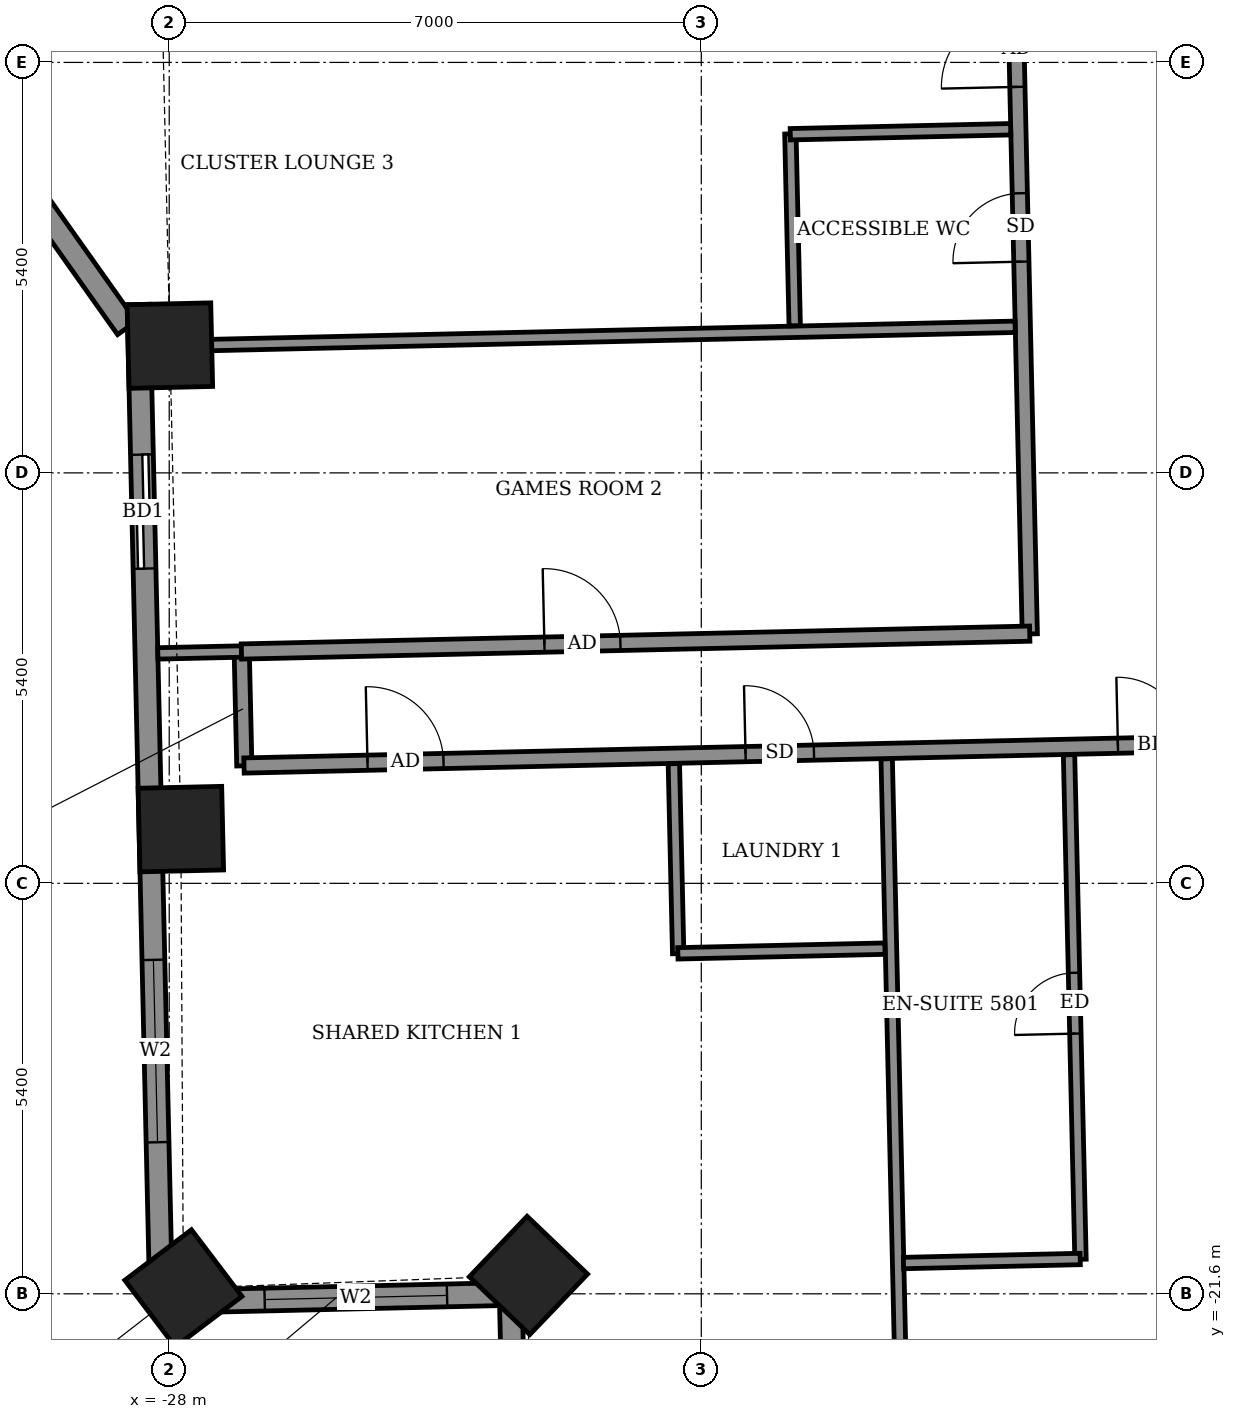
"""IFC4 building model, lengths in metres.
Left out: names, types, materials, properties, quantities, classifications, styles, units other than length and angle.
Written with IfcOpenShell. Run it as: python <this file> out.ifc"""

import sys

from ifc_helpers import new_model, si_unit, direction, frame, frame_2d, origin, origin_2d, place, context, subcontext, project, spatial, rectangle, extrude, element, fill, save


model = new_model("IFC4")
c1 = context("Model", 3, precision=1e-05, world=origin(), true_north=direction((0.0, 1.0)))
c2 = subcontext(c1, "Body", "Model", "MODEL_VIEW")
j1 = project(units=[si_unit("LENGTHUNIT", "METRE"), si_unit("PLANEANGLEUNIT", "RADIAN")], contexts=[c1])
p1 = place(None, origin())
s1 = spatial("IfcSite", under=j1, at=p1, CompositionType="ELEMENT")
p2 = place(p1, origin())
s2 = spatial("IfcBuilding", under=s1, at=p2, CompositionType="ELEMENT")
p3 = place(p2, frame((0.0, 0.0, 231.1)))
s3 = spatial("IfcBuildingStorey", under=s2, at=p3, CompositionType="ELEMENT", Elevation=231.1)
for number, where, z_axis, x_axis in (
    (1, (-27.991, -9.125, -0.55), (0.0, 0.0, 1.0), (0.023, -1.0, 0.0)),
    (2, (-27.847, -15.487, -0.55), (0.0, 0.0, 1.0), (0.023, -1.0, 0.0)),
    (3, (-27.814, -21.528, -0.55), (0.0, 0.0, 1.0), (0.604, -0.797, 0.0)),
    (4, (-23.274, -21.358, -0.55), (0.0, 0.0, 1.0), (0.723, -0.691, 0.0)),
):
    element("IfcColumn", number, at=place(p3, frame(where, z_axis=z_axis, x_axis=x_axis)), inside=s3, PredefinedType="COLUMN", context=c2, shape_type="SweptSolid", body=[
        extrude(rectangle(XDim=1.1, YDim=1.1, at=origin_2d()), origin(), (0.0, 0.0, 1.0), 3.6),
    ])
p4 = place(p3, frame((-30.62, -5.982, 0.0), z_axis=(0.0, 0.0, 1.0), x_axis=(0.578108441206, -0.815959943996, 0.0)))
e5 = element("IfcWall", 5, at=p4, inside=s3, PredefinedType="SOLIDWALL", context=c2, shape_type="SweptSolid", body=[
    extrude(rectangle(XDim=3.569, YDim=0.3, at=frame_2d((1.784, 0.0))), origin(), (0.0, 0.0, 1.0), 3.05),
])
p5 = place(p4, frame((0.338, 0.0, 0.9)))
e6 = element("IfcOpeningElement", 6, at=p5, cuts=e5, PredefinedType="OPENING", context=c2, shape_type="SweptSolid", body=[
    extrude(rectangle(XDim=1.2, YDim=1.5, at=frame_2d((0.6, 0.75))), frame((0.0, 0.16, 0.0), z_axis=(0.0, -1.0, 0.0), x_axis=(1.0, 0.0, 0.0)), (0.0, 0.0, 1.0), 0.32),
])
p6 = place(p3, frame((-28.404, -8.585, 0.0), z_axis=(0.0, 0.0, 1.0), x_axis=(0.022711264838, -0.99974206596, 0.0)))
e7 = element("IfcWall", 7, at=p6, inside=s3, PredefinedType="SOLIDWALL", context=c2, shape_type="SweptSolid", body=[
    extrude(rectangle(XDim=13.125, YDim=0.3, at=frame_2d((6.563, 0.0))), origin(), (0.0, 0.0, 1.0), 2.55),
])
p7 = place(p6, frame((1.975, 0.0, 0.0)))
e8 = element("IfcOpeningElement", 8, at=p7, cuts=e7, PredefinedType="OPENING", context=c2, shape_type="SweptSolid", body=[
    extrude(rectangle(XDim=1.5, YDim=2.4, at=frame_2d((0.75, 1.2))), frame((0.0, 0.16, 0.0), z_axis=(0.0, -1.0, 0.0), x_axis=(1.0, 0.0, 0.0)), (0.0, 0.0, 1.0), 0.32),
])
p8 = place(p6, frame((8.624, 0.0, 0.9)))
e9 = element("IfcOpeningElement", 9, at=p8, cuts=e7, PredefinedType="OPENING", context=c2, shape_type="SweptSolid", body=[
    extrude(rectangle(XDim=2.4, YDim=1.5, at=frame_2d((1.2, 0.75))), frame((0.0, 0.16, 0.0), z_axis=(0.0, -1.0, 0.0), x_axis=(1.0, 0.0, 0.0)), (0.0, 0.0, 1.0), 0.32),
])
p9 = place(p3, frame((-28.106, -21.707, 0.0), z_axis=(0.0, 0.0, 1.0), x_axis=(0.999739556364, 0.022821468877, 0.0)))
e10 = element("IfcWall", 10, at=p9, inside=s3, PredefinedType="SOLIDWALL", context=c2, shape_type="SweptSolid", body=[
    extrude(rectangle(XDim=4.6, YDim=0.3, at=frame_2d((2.3, 0.0))), origin(), (0.0, 0.0, 1.0), 2.55),
])
p10 = place(p9, frame((1.362, 0.0, 0.9)))
e11 = element("IfcOpeningElement", 11, at=p10, cuts=e10, PredefinedType="OPENING", context=c2, shape_type="SweptSolid", body=[
    extrude(rectangle(XDim=2.4, YDim=1.5, at=frame_2d((1.2, 0.75))), frame((0.0, 0.16, 0.0), z_axis=(0.0, -1.0, 0.0), x_axis=(1.0, 0.0, 0.0)), (0.0, 0.0, 1.0), 0.32),
])
p11 = place(p3, frame((-23.507, -21.602, 0.0), z_axis=(0.0, 0.0, 1.0), x_axis=(0.022609285172, -0.999744377441, 0.0)))
e12 = element("IfcWall", 12, at=p11, inside=s3, PredefinedType="SOLIDWALL", context=c2, shape_type="SweptSolid", body=[
    extrude(rectangle(XDim=4.6, YDim=0.3, at=frame_2d((2.3, 0.0))), origin(), (0.0, 0.0, 1.0), 2.55),
])
p12 = place(p11, frame((0.832, 0.0, 0.9)))
e13 = element("IfcOpeningElement", 13, at=p12, cuts=e12, PredefinedType="OPENING", context=c2, shape_type="SweptSolid", body=[
    extrude(rectangle(XDim=2.4, YDim=1.5, at=frame_2d((1.2, 0.75))), frame((0.0, 0.16, 0.0), z_axis=(0.0, -1.0, 0.0), x_axis=(1.0, 0.0, 0.0)), (0.0, 0.0, 1.0), 0.32),
])
p13 = place(p3, frame((-18.303, -25.935, 0.0), z_axis=(0.0, 0.0, 1.0), x_axis=(-0.022684355347, 0.999742676904, 0.0)))
e14 = element("IfcWall", 14, at=p13, inside=s3, PredefinedType="PARTITIONING", context=c2, shape_type="SweptSolid", body=[
    extrude(rectangle(XDim=11.376, YDim=0.15, at=frame_2d((5.688, 0.0))), origin(), (0.0, 0.0, 1.0), 2.55),
])
p14 = place(p3, frame((-16.011, -21.146, 0.0), z_axis=(0.0, 0.0, 1.0), x_axis=(-0.022760662159, 0.999740942574, 0.0)))
e15 = element("IfcWall", 15, at=p14, inside=s3, PredefinedType="PARTITIONING", context=c2, shape_type="SweptSolid", body=[
    extrude(rectangle(XDim=6.64, YDim=0.15, at=frame_2d((3.32, 0.0))), origin(), (0.0, 0.0, 1.0), 3.05),
])
p15 = place(p14, frame((2.97, 0.0, 0.0)))
e16 = element("IfcOpeningElement", 16, at=p15, cuts=e15, PredefinedType="OPENING", context=c2, shape_type="SweptSolid", body=[
    extrude(rectangle(XDim=0.8, YDim=2.1, at=frame_2d((0.4, 1.05))), frame((0.0, 0.085, 0.0), z_axis=(0.0, -1.0, 0.0), x_axis=(1.0, 0.0, 0.0)), (0.0, 0.0, 1.0), 0.17),
])
p16 = place(p3, frame((-18.34, -21.195, 0.0), z_axis=(0.0, 0.0, 1.0), x_axis=(0.99974053329, 0.022778632478, 0.0)))
e17 = element("IfcWall", 17, at=p16, inside=s3, PredefinedType="PARTITIONING", context=c2, shape_type="SweptSolid", body=[
    extrude(rectangle(XDim=2.326, YDim=0.15, at=frame_2d((1.163, 0.0))), origin(), (0.0, 0.0, 1.0), 3.05),
])
p17 = place(p3, frame((-21.304, -17.125, 0.0), z_axis=(0.0, 0.0, 1.0), x_axis=(-0.022854521249, 0.999738801317, 0.0)))
e18 = element("IfcWall", 18, at=p17, inside=s3, PredefinedType="PARTITIONING", context=c2, shape_type="SweptSolid", body=[
    extrude(rectangle(XDim=2.5, YDim=0.15, at=frame_2d((1.25, 0.0))), origin(), (0.0, 0.0, 1.0), 3.05),
])
p18 = place(p3, frame((-21.308, -17.121, 0.0), z_axis=(0.0, 0.0, 1.0), x_axis=(0.999741002259, 0.022758040381, 0.0)))
e19 = element("IfcWall", 19, at=p18, inside=s3, PredefinedType="PARTITIONING", context=c2, shape_type="SweptSolid", body=[
    extrude(rectangle(XDim=2.725, YDim=0.15, at=frame_2d((1.362, 0.0))), origin(), (0.0, 0.0, 1.0), 3.05),
])
p19 = place(p3, frame((-27.012, -14.654, 0.0), z_axis=(0.0, 0.0, 1.0), x_axis=(-0.022617910375, 0.999744182344, 0.0)))
e20 = element("IfcWall", 20, at=p19, inside=s3, PredefinedType="PARTITIONING", context=c2, shape_type="SweptSolid", body=[
    extrude(rectangle(XDim=1.5, YDim=0.2, at=frame_2d((0.75, 0.0))), origin(), (0.0, 0.0, 1.0), 3.05),
])
p20 = place(p3, frame((-27.016, -14.65, 0.0), z_axis=(0.0, 0.0, 1.0), x_axis=(0.999742623033, 0.022686729391, 0.0)))
e21 = element("IfcWall", 21, at=p20, inside=s3, PredefinedType="PARTITIONING", context=c2, shape_type="SweptSolid", body=[
    extrude(rectangle(XDim=50.858, YDim=0.2, at=frame_2d((25.429, 0.0))), origin(), (0.0, 0.0, 1.0), 3.05),
])
p21 = place(p20, frame((1.625, 0.0, 0.0)))
e22 = element("IfcOpeningElement", 22, at=p21, cuts=e21, PredefinedType="OPENING", context=c2, shape_type="SweptSolid", body=[
    extrude(rectangle(XDim=1.0, YDim=2.1, at=frame_2d((0.5, 1.05))), frame((0.0, 0.11, 0.0), z_axis=(0.0, -1.0, 0.0), x_axis=(1.0, 0.0, 0.0)), (0.0, 0.0, 1.0), 0.22),
])
p22 = place(p20, frame((6.6, 0.0, 0.0)))
e23 = element("IfcOpeningElement", 23, at=p22, cuts=e21, PredefinedType="OPENING", context=c2, shape_type="SweptSolid", body=[
    extrude(rectangle(XDim=0.9, YDim=2.1, at=frame_2d((0.45, 1.05))), frame((0.0, 0.11, 0.0), z_axis=(0.0, -1.0, 0.0), x_axis=(1.0, 0.0, 0.0)), (0.0, 0.0, 1.0), 0.22),
])
p23 = place(p20, frame((11.5, 0.0, 0.0)))
e24 = element("IfcOpeningElement", 24, at=p23, cuts=e21, PredefinedType="OPENING", context=c2, shape_type="SweptSolid", body=[
    extrude(rectangle(XDim=0.9, YDim=2.1, at=frame_2d((0.45, 1.05))), frame((0.0, 0.11, 0.0), z_axis=(0.0, -1.0, 0.0), x_axis=(1.0, 0.0, 0.0)), (0.0, 0.0, 1.0), 0.22),
])
p24 = place(p20, frame((13.675, 0.0, 0.0)))
e25 = element("IfcOpeningElement", 25, at=p24, cuts=e21, PredefinedType="OPENING", context=c2, shape_type="SweptSolid", body=[
    extrude(rectangle(XDim=0.9, YDim=2.1, at=frame_2d((0.45, 1.05))), frame((0.0, 0.11, 0.0), z_axis=(0.0, -1.0, 0.0), x_axis=(1.0, 0.0, 0.0)), (0.0, 0.0, 1.0), 0.22),
])
p25 = place(p20, frame((20.625, 0.0, 0.0)))
e26 = element("IfcOpeningElement", 26, at=p25, cuts=e21, PredefinedType="OPENING", context=c2, shape_type="SweptSolid", body=[
    extrude(rectangle(XDim=0.9, YDim=2.1, at=frame_2d((0.45, 1.05))), frame((0.0, 0.11, 0.0), z_axis=(0.0, -1.0, 0.0), x_axis=(1.0, 0.0, 0.0)), (0.0, 0.0, 1.0), 0.22),
])
p26 = place(p20, frame((22.775, 0.0, 0.0)))
e27 = element("IfcOpeningElement", 27, at=p26, cuts=e21, PredefinedType="OPENING", context=c2, shape_type="SweptSolid", body=[
    extrude(rectangle(XDim=0.9, YDim=2.1, at=frame_2d((0.45, 1.05))), frame((0.0, 0.11, 0.0), z_axis=(0.0, -1.0, 0.0), x_axis=(1.0, 0.0, 0.0)), (0.0, 0.0, 1.0), 0.22),
])
p27 = place(p20, frame((29.65, 0.0, 0.0)))
e28 = element("IfcOpeningElement", 28, at=p27, cuts=e21, PredefinedType="OPENING", context=c2, shape_type="SweptSolid", body=[
    extrude(rectangle(XDim=0.9, YDim=2.1, at=frame_2d((0.45, 1.05))), frame((0.0, 0.11, 0.0), z_axis=(0.0, -1.0, 0.0), x_axis=(1.0, 0.0, 0.0)), (0.0, 0.0, 1.0), 0.22),
])
p28 = place(p20, frame((31.625, 0.0, 0.0)))
e29 = element("IfcOpeningElement", 29, at=p28, cuts=e21, PredefinedType="OPENING", context=c2, shape_type="SweptSolid", body=[
    extrude(rectangle(XDim=0.9, YDim=2.1, at=frame_2d((0.45, 1.05))), frame((0.0, 0.11, 0.0), z_axis=(0.0, -1.0, 0.0), x_axis=(1.0, 0.0, 0.0)), (0.0, 0.0, 1.0), 0.22),
])
p29 = place(p20, frame((38.5, 0.0, 0.0)))
e30 = element("IfcOpeningElement", 30, at=p29, cuts=e21, PredefinedType="OPENING", context=c2, shape_type="SweptSolid", body=[
    extrude(rectangle(XDim=0.9, YDim=2.1, at=frame_2d((0.45, 1.05))), frame((0.0, 0.11, 0.0), z_axis=(0.0, -1.0, 0.0), x_axis=(1.0, 0.0, 0.0)), (0.0, 0.0, 1.0), 0.22),
])
p30 = place(p20, frame((40.55, 0.0, 0.0)))
e31 = element("IfcOpeningElement", 31, at=p30, cuts=e21, PredefinedType="OPENING", context=c2, shape_type="SweptSolid", body=[
    extrude(rectangle(XDim=0.9, YDim=2.1, at=frame_2d((0.45, 1.05))), frame((0.0, 0.11, 0.0), z_axis=(0.0, -1.0, 0.0), x_axis=(1.0, 0.0, 0.0)), (0.0, 0.0, 1.0), 0.22),
])
p31 = place(p20, frame((47.601, 0.0, 0.0)))
e32 = element("IfcOpeningElement", 32, at=p31, cuts=e21, PredefinedType="OPENING", context=c2, shape_type="SweptSolid", body=[
    extrude(rectangle(XDim=1.0, YDim=2.1, at=frame_2d((0.5, 1.05))), frame((0.0, 0.11, 0.0), z_axis=(0.0, -1.0, 0.0), x_axis=(1.0, 0.0, 0.0)), (0.0, 0.0, 1.0), 0.22),
])
p32 = place(p3, frame((-16.678, -12.919, 0.0), z_axis=(0.0, 0.0, 1.0), x_axis=(-0.022696191528, 0.999742408268, 0.0)))
e33 = element("IfcWall", 33, at=p32, inside=s3, PredefinedType="PARTITIONING", context=c2, shape_type="SweptSolid", body=[
    extrude(rectangle(XDim=25.074, YDim=0.2, at=frame_2d((12.537, 0.0))), origin(), (0.0, 0.0, 1.0), 3.05),
])
p33 = place(p32, frame((21.237, 0.0, 0.0)))
e34 = element("IfcOpeningElement", 34, at=p33, cuts=e33, PredefinedType="OPENING", context=c2, shape_type="SweptSolid", body=[
    extrude(rectangle(XDim=1.0, YDim=2.1, at=frame_2d((0.5, 1.05))), frame((0.0, 0.11, 0.0), z_axis=(0.0, -1.0, 0.0), x_axis=(1.0, 0.0, 0.0)), (0.0, 0.0, 1.0), 0.22),
])
p34 = place(p32, frame((23.424, 0.0, 0.0)))
e35 = element("IfcOpeningElement", 35, at=p34, cuts=e33, PredefinedType="OPENING", context=c2, shape_type="SweptSolid", body=[
    extrude(rectangle(XDim=0.9, YDim=2.1, at=frame_2d((0.45, 1.05))), frame((0.0, 0.11, 0.0), z_axis=(0.0, -1.0, 0.0), x_axis=(1.0, 0.0, 0.0)), (0.0, 0.0, 1.0), 0.22),
])
p35 = place(p32, frame((18.799, 0.0, 0.0)))
e36 = element("IfcOpeningElement", 36, at=p35, cuts=e33, PredefinedType="OPENING", context=c2, shape_type="SweptSolid", body=[
    extrude(rectangle(XDim=1.0, YDim=2.1, at=frame_2d((0.5, 1.05))), frame((0.0, 0.11, 0.0), z_axis=(0.0, -1.0, 0.0), x_axis=(1.0, 0.0, 0.0)), (0.0, 0.0, 1.0), 0.22),
])
p36 = place(p32, frame((15.759, 0.0, 0.0)))
e37 = element("IfcOpeningElement", 37, at=p36, cuts=e33, PredefinedType="OPENING", context=c2, shape_type="SweptSolid", body=[
    extrude(rectangle(XDim=1.0, YDim=2.1, at=frame_2d((0.5, 1.05))), frame((0.0, 0.11, 0.0), z_axis=(0.0, -1.0, 0.0), x_axis=(1.0, 0.0, 0.0)), (0.0, 0.0, 1.0), 0.22),
])
p37 = place(p32, frame((12.76, 0.0, 0.0)))
e38 = element("IfcOpeningElement", 38, at=p37, cuts=e33, PredefinedType="OPENING", context=c2, shape_type="SweptSolid", body=[
    extrude(rectangle(XDim=1.0, YDim=2.1, at=frame_2d((0.5, 1.05))), frame((0.0, 0.11, 0.0), z_axis=(0.0, -1.0, 0.0), x_axis=(1.0, 0.0, 0.0)), (0.0, 0.0, 1.0), 0.22),
])
p38 = place(p32, frame((9.752, 0.0, 0.0)))
e39 = element("IfcOpeningElement", 39, at=p38, cuts=e33, PredefinedType="OPENING", context=c2, shape_type="SweptSolid", body=[
    extrude(rectangle(XDim=1.0, YDim=2.1, at=frame_2d((0.5, 1.05))), frame((0.0, 0.11, 0.0), z_axis=(0.0, -1.0, 0.0), x_axis=(1.0, 0.0, 0.0)), (0.0, 0.0, 1.0), 0.22),
])
p39 = place(p32, frame((7.199, 0.0, 0.0)))
e40 = element("IfcOpeningElement", 40, at=p39, cuts=e33, PredefinedType="OPENING", context=c2, shape_type="SweptSolid", body=[
    extrude(rectangle(XDim=1.0, YDim=2.1, at=frame_2d((0.5, 1.05))), frame((0.0, 0.11, 0.0), z_axis=(0.0, -1.0, 0.0), x_axis=(1.0, 0.0, 0.0)), (0.0, 0.0, 1.0), 0.22),
])
p40 = place(p32, frame((4.899, 0.0, 0.0)))
e41 = element("IfcOpeningElement", 41, at=p40, cuts=e33, PredefinedType="OPENING", context=c2, shape_type="SweptSolid", body=[
    extrude(rectangle(XDim=0.9, YDim=2.1, at=frame_2d((0.45, 1.05))), frame((0.0, 0.11, 0.0), z_axis=(0.0, -1.0, 0.0), x_axis=(1.0, 0.0, 0.0)), (0.0, 0.0, 1.0), 0.22),
])
p41 = place(p3, frame((-28.15, -13.175, 0.0), z_axis=(0.0, 0.0, 1.0), x_axis=(0.999740692912, 0.02277162569, 0.0)))
e42 = element("IfcWall", 42, at=p41, inside=s3, PredefinedType="PARTITIONING", context=c2, shape_type="SweptSolid", body=[
    extrude(rectangle(XDim=1.104, YDim=0.15, at=frame_2d((0.552, 0.0))), origin(), (0.0, 0.0, 1.0), 2.55),
])
p42 = place(p3, frame((-27.05, -13.15, 0.0), z_axis=(0.0, 0.0, 1.0), x_axis=(0.999743679035, 0.022640146404, 0.0)))
e43 = element("IfcWall", 43, at=p42, inside=s3, PredefinedType="PARTITIONING", context=c2, shape_type="SweptSolid", body=[
    extrude(rectangle(XDim=10.374, YDim=0.2, at=frame_2d((5.187, 0.0))), origin(), (0.0, 0.0, 1.0), 3.05),
])
p43 = place(p42, frame((3.987, 0.0, 0.0)))
e44 = element("IfcOpeningElement", 44, at=p43, cuts=e43, PredefinedType="OPENING", context=c2, shape_type="SweptSolid", body=[
    extrude(rectangle(XDim=1.0, YDim=2.1, at=frame_2d((0.5, 1.05))), frame((0.0, 0.11, 0.0), z_axis=(0.0, -1.0, 0.0), x_axis=(1.0, 0.0, 0.0)), (0.0, 0.0, 1.0), 0.22),
])
p44 = place(p3, frame((-28.241, -9.136, 0.0), z_axis=(0.0, 0.0, 1.0), x_axis=(0.999742533279, 0.022690684282, 0.0)))
e45 = element("IfcWall", 45, at=p44, inside=s3, PredefinedType="PARTITIONING", context=c2, shape_type="SweptSolid", body=[
    extrude(rectangle(XDim=11.373, YDim=0.15, at=frame_2d((5.687, 0.0))), origin(), (0.0, 0.0, 1.0), 3.05),
])
p45 = place(p3, frame((-19.771, -8.864, 0.0), z_axis=(0.0, 0.0, 1.0), x_axis=(-0.022532486354, 0.9997461113, 0.0)))
e46 = element("IfcWall", 46, at=p45, inside=s3, PredefinedType="PARTITIONING", context=c2, shape_type="SweptSolid", body=[
    extrude(rectangle(XDim=2.525, YDim=0.15, at=frame_2d((1.262, 0.0))), origin(), (0.0, 0.0, 1.0), 3.05),
])
p46 = place(p3, frame((-19.829, -6.345, 0.0), z_axis=(0.0, 0.0, 1.0), x_axis=(0.999741618182, 0.022730967319, 0.0)))
e47 = element("IfcWall", 47, at=p46, inside=s3, PredefinedType="PARTITIONING", context=c2, shape_type="SweptSolid", body=[
    extrude(rectangle(XDim=2.9, YDim=0.15, at=frame_2d((1.45, 0.0))), origin(), (0.0, 0.0, 1.0), 3.05),
])
p47 = place(p7, origin())
e48 = element("IfcDoor", 48, at=p47, inside=s3, OperationType="SLIDING_TO_LEFT", PredefinedType="DOOR", context=c2, shape_type="SweptSolid", body=[
    extrude(rectangle(XDim=1.5, YDim=2.4, at=frame_2d((0.75, 1.2))), frame((0.0, 0.025, 0.0), z_axis=(0.0, -1.0, 0.0), x_axis=(1.0, 0.0, 0.0)), (0.0, 0.0, 1.0), 0.05),
])
fill(e8, e48)
p48 = place(p8, origin())
e49 = element("IfcWindow", 49, at=p48, inside=s3, PartitioningType="DOUBLE_PANEL_VERTICAL", PredefinedType="WINDOW", context=c2, shape_type="SweptSolid", body=[
    extrude(rectangle(XDim=2.4, YDim=1.5, at=frame_2d((1.2, 0.75))), frame((0.0, 0.03, 0.0), z_axis=(0.0, -1.0, 0.0), x_axis=(1.0, 0.0, 0.0)), (0.0, 0.0, 1.0), 0.06),
])
fill(e9, e49)
p49 = place(p10, origin())
e50 = element("IfcWindow", 50, at=p49, inside=s3, PartitioningType="DOUBLE_PANEL_VERTICAL", PredefinedType="WINDOW", context=c2, shape_type="SweptSolid", body=[
    extrude(rectangle(XDim=2.4, YDim=1.5, at=frame_2d((1.2, 0.75))), frame((0.0, 0.03, 0.0), z_axis=(0.0, -1.0, 0.0), x_axis=(1.0, 0.0, 0.0)), (0.0, 0.0, 1.0), 0.06),
])
fill(e11, e50)
p50 = place(p21, origin())
e51 = element("IfcDoor", 51, at=p50, inside=s3, OperationType="SINGLE_SWING_LEFT", PredefinedType="DOOR", context=c2, shape_type="SweptSolid", body=[
    extrude(rectangle(XDim=1.0, YDim=2.1, at=frame_2d((0.5, 1.05))), frame((0.0, 0.025, 0.0), z_axis=(0.0, -1.0, 0.0), x_axis=(1.0, 0.0, 0.0)), (0.0, 0.0, 1.0), 0.05),
])
fill(e22, e51)
p51 = place(p22, origin())
e52 = element("IfcDoor", 52, at=p51, inside=s3, OperationType="SINGLE_SWING_LEFT", PredefinedType="DOOR", context=c2, shape_type="SweptSolid", body=[
    extrude(rectangle(XDim=0.9, YDim=2.1, at=frame_2d((0.45, 1.05))), frame((0.0, 0.025, 0.0), z_axis=(0.0, -1.0, 0.0), x_axis=(1.0, 0.0, 0.0)), (0.0, 0.0, 1.0), 0.05),
])
fill(e23, e52)
p52 = place(p23, origin())
e53 = element("IfcDoor", 53, at=p52, inside=s3, OperationType="SINGLE_SWING_LEFT", PredefinedType="DOOR", context=c2, shape_type="SweptSolid", body=[
    extrude(rectangle(XDim=0.9, YDim=2.1, at=frame_2d((0.45, 1.05))), frame((0.0, 0.025, 0.0), z_axis=(0.0, -1.0, 0.0), x_axis=(1.0, 0.0, 0.0)), (0.0, 0.0, 1.0), 0.05),
])
fill(e24, e53)
p53 = place(p15, origin())
e54 = element("IfcDoor", 54, at=p53, inside=s3, OperationType="SINGLE_SWING_LEFT", PredefinedType="DOOR", context=c2, shape_type="SweptSolid", body=[
    extrude(rectangle(XDim=0.8, YDim=2.1, at=frame_2d((0.4, 1.05))), frame((0.0, 0.025, 0.0), z_axis=(0.0, -1.0, 0.0), x_axis=(1.0, 0.0, 0.0)), (0.0, 0.0, 1.0), 0.05),
])
fill(e16, e54)
p54 = place(p39, origin())
e55 = element("IfcDoor", 55, at=p54, inside=s3, OperationType="SINGLE_SWING_RIGHT", PredefinedType="DOOR", context=c2, shape_type="SweptSolid", body=[
    extrude(rectangle(XDim=1.0, YDim=2.1, at=frame_2d((0.5, 1.05))), frame((0.0, 0.025, 0.0), z_axis=(0.0, -1.0, 0.0), x_axis=(1.0, 0.0, 0.0)), (0.0, 0.0, 1.0), 0.05),
])
fill(e40, e55)
p55 = place(p40, origin())
e56 = element("IfcDoor", 56, at=p55, inside=s3, OperationType="SINGLE_SWING_LEFT", PredefinedType="DOOR", context=c2, shape_type="SweptSolid", body=[
    extrude(rectangle(XDim=0.9, YDim=2.1, at=frame_2d((0.45, 1.05))), frame((0.0, 0.025, 0.0), z_axis=(0.0, -1.0, 0.0), x_axis=(1.0, 0.0, 0.0)), (0.0, 0.0, 1.0), 0.05),
])
fill(e41, e56)
p56 = place(p43, origin())
e57 = element("IfcDoor", 57, at=p56, inside=s3, OperationType="SINGLE_SWING_LEFT", PredefinedType="DOOR", context=c2, shape_type="SweptSolid", body=[
    extrude(rectangle(XDim=1.0, YDim=2.1, at=frame_2d((0.5, 1.05))), frame((0.0, 0.025, 0.0), z_axis=(0.0, -1.0, 0.0), x_axis=(1.0, 0.0, 0.0)), (0.0, 0.0, 1.0), 0.05),
])
fill(e44, e57)
save(model, sys.argv[1])
